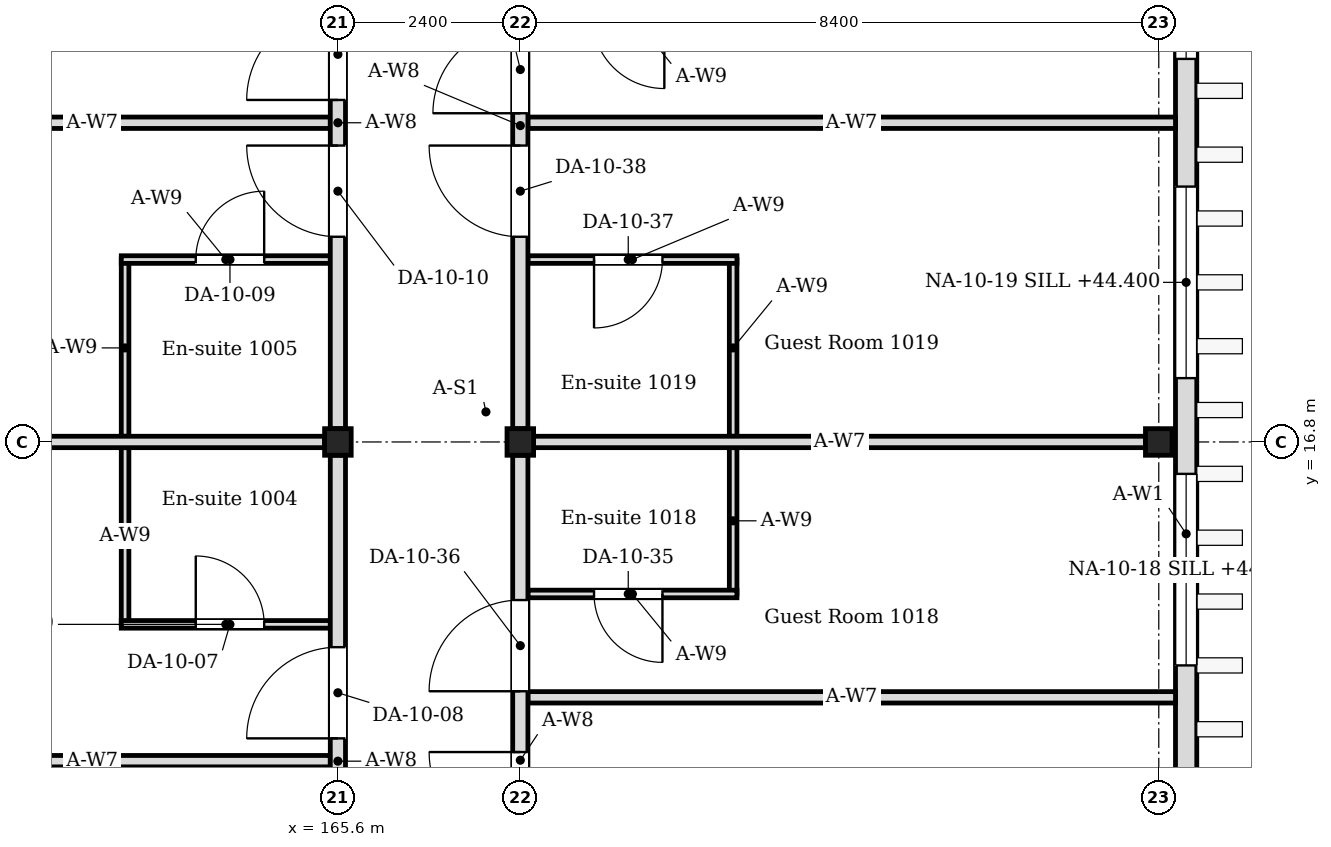
"""IFC4 building model, lengths in metres.
Left out: names, types, materials, properties, quantities, classifications, styles, units other than length and angle.
Written with IfcOpenShell. Run it as: python <this file> out.ifc"""

import sys

from ifc_helpers import new_model, si_unit, direction, frame, frame_2d, origin, origin_2d, place, context, subcontext, project, spatial, rectangle, i_section, extrude, element, fill, save


model = new_model("IFC4")
c1 = context("Model", 3, precision=1e-05, world=origin(), true_north=direction((0.0, 1.0)))
c2 = subcontext(c1, "Body", "Model", "MODEL_VIEW")
j1 = project(units=[si_unit("LENGTHUNIT", "METRE"), si_unit("PLANEANGLEUNIT", "RADIAN")], contexts=[c1])
p1 = place(None, origin())
s1 = spatial("IfcSite", under=j1, at=p1, CompositionType="ELEMENT")
p2 = place(p1, origin())
s2 = spatial("IfcBuilding", under=s1, at=p2, CompositionType="ELEMENT")
p3 = place(p2, frame((0.0, 0.0, 43.8)))
s3 = spatial("IfcBuildingStorey", under=s2, at=p3, CompositionType="ELEMENT", Elevation=43.8)
for number, where, z_axis, x_axis in (
    (1, (165.6, 16.8, 0.0), (0.0, 0.0, 1.0), (1.0, 0.0, 0.0)),
    (2, (168.0, 16.8, 0.0), (0.0, 0.0, 1.0), (1.0, 0.0, 0.0)),
    (3, (176.4, 16.8, 0.0), (0.0, 0.0, 1.0), (1.0, 0.0, 0.0)),
):
    element("IfcColumn", number, at=place(p3, frame(where, z_axis=z_axis, x_axis=x_axis)), inside=s3, PredefinedType="COLUMN", context=c2, shape_type="SweptSolid", body=[
        extrude(i_section(OverallWidth=0.35, OverallDepth=0.35, WebThickness=0.012, FlangeThickness=0.019, FilletRadius=0.013, at=origin_2d()), origin(), (0.0, 0.0, 1.0), 4.2),
    ])
p4 = place(p3, frame((176.76, -0.22, 0.0), z_axis=(0.0, 0.0, 1.0), x_axis=(0.0, 1.0, 0.0)))
e4 = element("IfcWall", 4, at=p4, inside=s3, PredefinedType="SOLIDWALL", context=c2, shape_type="SweptSolid", body=[
    extrude(rectangle(XDim=42.57, YDim=0.28, at=frame_2d((21.285, 0.0))), origin(), (0.0, 0.0, 1.0), 4.05),
])
p5 = place(p4, frame((9.88, 0.0, 0.6)))
e5 = element("IfcOpeningElement", 5, at=p5, cuts=e4, PredefinedType="OPENING", context=c2, shape_type="SweptSolid", body=[
    extrude(rectangle(XDim=2.52, YDim=2.4, at=frame_2d((1.26, 1.2))), frame((0.0, 0.15, 0.0), z_axis=(0.0, -1.0, 0.0), x_axis=(1.0, 0.0, 0.0)), (0.0, 0.0, 1.0), 0.3),
])
p6 = place(p4, frame((14.08, 0.0, 0.6)))
e6 = element("IfcOpeningElement", 6, at=p6, cuts=e4, PredefinedType="OPENING", context=c2, shape_type="SweptSolid", body=[
    extrude(rectangle(XDim=2.52, YDim=2.4, at=frame_2d((1.26, 1.2))), frame((0.0, 0.15, 0.0), z_axis=(0.0, -1.0, 0.0), x_axis=(1.0, 0.0, 0.0)), (0.0, 0.0, 1.0), 0.3),
])
p7 = place(p4, frame((17.86, 0.0, 0.6)))
e7 = element("IfcOpeningElement", 7, at=p7, cuts=e4, PredefinedType="OPENING", context=c2, shape_type="SweptSolid", body=[
    extrude(rectangle(XDim=2.52, YDim=2.4, at=frame_2d((1.26, 1.2))), frame((0.0, 0.15, 0.0), z_axis=(0.0, -1.0, 0.0), x_axis=(1.0, 0.0, 0.0)), (0.0, 0.0, 1.0), 0.3),
])
p8 = place(p4, frame((22.06, 0.0, 0.45)))
e8 = element("IfcOpeningElement", 8, at=p8, cuts=e4, PredefinedType="OPENING", context=c2, shape_type="SweptSolid", body=[
    extrude(rectangle(XDim=2.52, YDim=2.1, at=frame_2d((1.26, 1.05))), frame((0.0, 0.15, 0.0), z_axis=(0.0, -1.0, 0.0), x_axis=(1.0, 0.0, 0.0)), (0.0, 0.0, 1.0), 0.3),
])
p9 = place(p3, frame((162.8, 14.4, 0.0), z_axis=(0.0, 0.0, 1.0), x_axis=(0.0, 1.0, 0.0)))
e9 = element("IfcWall", 9, at=p9, inside=s3, PredefinedType="PARTITIONING", context=c2, shape_type="SweptSolid", body=[
    extrude(rectangle(XDim=2.325, YDim=0.1, at=frame_2d((1.163, 0.0))), origin(), (0.0, 0.0, 1.0), 4.05),
])
p10 = place(p3, frame((162.75, 14.4, 0.0), z_axis=(0.0, 0.0, 1.0), x_axis=(1.0, 0.0, 0.0)))
e10 = element("IfcWall", 10, at=p10, inside=s3, PredefinedType="PARTITIONING", context=c2, shape_type="SweptSolid", body=[
    extrude(rectangle(XDim=2.75, YDim=0.1, at=frame_2d((1.375, 0.0))), origin(), (0.0, 0.0, 1.0), 4.05),
])
p11 = place(p10, frame((0.98, 0.0, 0.0)))
e11 = element("IfcOpeningElement", 11, at=p11, cuts=e10, PredefinedType="OPENING", context=c2, shape_type="SweptSolid", body=[
    extrude(rectangle(XDim=0.9, YDim=2.1, at=frame_2d((0.45, 1.05))), frame((0.0, 0.06, 0.0), z_axis=(0.0, -1.0, 0.0), x_axis=(1.0, 0.0, 0.0)), (0.0, 0.0, 1.0), 0.12),
])
p12 = place(p3, frame((162.8, 16.875, 0.0), z_axis=(0.0, 0.0, 1.0), x_axis=(0.0, 1.0, 0.0)))
e12 = element("IfcWall", 12, at=p12, inside=s3, PredefinedType="PARTITIONING", context=c2, shape_type="SweptSolid", body=[
    extrude(rectangle(XDim=2.325, YDim=0.1, at=frame_2d((1.163, 0.0))), origin(), (0.0, 0.0, 1.0), 4.05),
])
p13 = place(p3, frame((162.75, 19.2, 0.0), z_axis=(0.0, 0.0, 1.0), x_axis=(1.0, 0.0, 0.0)))
e13 = element("IfcWall", 13, at=p13, inside=s3, PredefinedType="PARTITIONING", context=c2, shape_type="SweptSolid", body=[
    extrude(rectangle(XDim=2.75, YDim=0.1, at=frame_2d((1.375, 0.0))), origin(), (0.0, 0.0, 1.0), 4.05),
])
p14 = place(p13, frame((0.98, 0.0, 0.0)))
e14 = element("IfcOpeningElement", 14, at=p14, cuts=e13, PredefinedType="OPENING", context=c2, shape_type="SweptSolid", body=[
    extrude(rectangle(XDim=0.9, YDim=2.1, at=frame_2d((0.45, 1.05))), frame((0.0, 0.06, 0.0), z_axis=(0.0, -1.0, 0.0), x_axis=(1.0, 0.0, 0.0)), (0.0, 0.0, 1.0), 0.12),
])
p15 = place(p3, frame((170.8, 14.8, 0.0), z_axis=(0.0, 0.0, 1.0), x_axis=(0.0, 1.0, 0.0)))
e15 = element("IfcWall", 15, at=p15, inside=s3, PredefinedType="PARTITIONING", context=c2, shape_type="SweptSolid", body=[
    extrude(rectangle(XDim=1.925, YDim=0.1, at=frame_2d((0.962, 0.0))), origin(), (0.0, 0.0, 1.0), 4.05),
])
p16 = place(p3, frame((170.85, 14.8, 0.0), z_axis=(0.0, 0.0, 1.0), x_axis=(-1.0, 0.0, 0.0)))
e16 = element("IfcWall", 16, at=p16, inside=s3, PredefinedType="PARTITIONING", context=c2, shape_type="SweptSolid", body=[
    extrude(rectangle(XDim=2.75, YDim=0.1, at=frame_2d((1.375, 0.0))), origin(), (0.0, 0.0, 1.0), 4.05),
])
p17 = place(p16, frame((0.98, 0.0, 0.0)))
e17 = element("IfcOpeningElement", 17, at=p17, cuts=e16, PredefinedType="OPENING", context=c2, shape_type="SweptSolid", body=[
    extrude(rectangle(XDim=0.9, YDim=2.1, at=frame_2d((0.45, 1.05))), frame((0.0, 0.06, 0.0), z_axis=(0.0, -1.0, 0.0), x_axis=(1.0, 0.0, 0.0)), (0.0, 0.0, 1.0), 0.12),
])
p18 = place(p3, frame((170.8, 16.875, 0.0), z_axis=(0.0, 0.0, 1.0), x_axis=(0.0, 1.0, 0.0)))
e18 = element("IfcWall", 18, at=p18, inside=s3, PredefinedType="PARTITIONING", context=c2, shape_type="SweptSolid", body=[
    extrude(rectangle(XDim=2.325, YDim=0.1, at=frame_2d((1.163, 0.0))), origin(), (0.0, 0.0, 1.0), 4.05),
])
p19 = place(p3, frame((170.85, 19.2, 0.0), z_axis=(0.0, 0.0, 1.0), x_axis=(-1.0, 0.0, 0.0)))
e19 = element("IfcWall", 19, at=p19, inside=s3, PredefinedType="PARTITIONING", context=c2, shape_type="SweptSolid", body=[
    extrude(rectangle(XDim=2.75, YDim=0.1, at=frame_2d((1.375, 0.0))), origin(), (0.0, 0.0, 1.0), 4.05),
])
p20 = place(p19, frame((0.98, 0.0, 0.0)))
e20 = element("IfcOpeningElement", 20, at=p20, cuts=e19, PredefinedType="OPENING", context=c2, shape_type="SweptSolid", body=[
    extrude(rectangle(XDim=0.9, YDim=2.1, at=frame_2d((0.45, 1.05))), frame((0.0, 0.06, 0.0), z_axis=(0.0, -1.0, 0.0), x_axis=(1.0, 0.0, 0.0)), (0.0, 0.0, 1.0), 0.12),
])
for number, where, z_axis, x_axis in (
    (21, (157.375, 16.8, 0.0), (0.0, 0.0, 1.0), (1.0, 0.0, 0.0)),
    (22, (168.175, 16.8, 0.0), (0.0, 0.0, 1.0), (1.0, 0.0, 0.0)),
):
    element("IfcWall", number, at=place(p3, frame(where, z_axis=z_axis, x_axis=x_axis)), inside=s3, PredefinedType="PARTITIONING", context=c2, shape_type="SweptSolid", body=[
        extrude(rectangle(XDim=8.05, YDim=0.15, at=frame_2d((4.025, 0.0))), origin(), (0.0, 0.0, 1.0), 3.604),
    ])
for number, where, z_axis, x_axis in (
    (23, (159.24, 12.6, 0.0), (0.0, 0.0, 1.0), (1.0, 0.0, 0.0)),
    (24, (159.24, 21.0, 0.0), (0.0, 0.0, 1.0), (1.0, 0.0, 0.0)),
):
    element("IfcWall", number, at=place(p3, frame(where, z_axis=z_axis, x_axis=x_axis)), inside=s3, PredefinedType="PARTITIONING", context=c2, shape_type="SweptSolid", body=[
        extrude(rectangle(XDim=6.26, YDim=0.15, at=frame_2d((3.13, 0.0))), origin(), (0.0, 0.0, 1.0), 3.604),
    ])
for number, where, z_axis, x_axis in (
    (25, (168.1, 13.44, 0.0), (0.0, 0.0, 1.0), (1.0, 0.0, 0.0)),
    (26, (168.1, 21.0, 0.0), (0.0, 0.0, 1.0), (1.0, 0.0, 0.0)),
):
    element("IfcWall", number, at=place(p3, frame(where, z_axis=z_axis, x_axis=x_axis)), inside=s3, PredefinedType="PARTITIONING", context=c2, shape_type="SweptSolid", body=[
        extrude(rectangle(XDim=8.52, YDim=0.15, at=frame_2d((4.26, 0.0))), origin(), (0.0, 0.0, 1.0), 3.604),
    ])
p21 = place(p3, frame((165.6, 8.575, 0.0), z_axis=(0.0, 0.0, 1.0), x_axis=(0.0, 1.0, 0.0)))
e27 = element("IfcWall", 27, at=p21, inside=s3, PredefinedType="PARTITIONING", context=c2, shape_type="SweptSolid", body=[
    extrude(rectangle(XDim=8.05, YDim=0.2, at=frame_2d((4.025, 0.0))), origin(), (0.0, 0.0, 1.0), 3.45),
])
p22 = place(p21, frame((2.525, 0.0, 0.0)))
e28 = element("IfcOpeningElement", 28, at=p22, cuts=e27, PredefinedType="OPENING", context=c2, shape_type="SweptSolid", body=[
    extrude(rectangle(XDim=1.2, YDim=2.1, at=frame_2d((0.6, 1.05))), frame((0.0, 0.11, 0.0), z_axis=(0.0, -1.0, 0.0), x_axis=(1.0, 0.0, 0.0)), (0.0, 0.0, 1.0), 0.22),
])
p23 = place(p21, frame((4.325, 0.0, 0.0)))
e29 = element("IfcOpeningElement", 29, at=p23, cuts=e27, PredefinedType="OPENING", context=c2, shape_type="SweptSolid", body=[
    extrude(rectangle(XDim=1.2, YDim=2.1, at=frame_2d((0.6, 1.05))), frame((0.0, 0.11, 0.0), z_axis=(0.0, -1.0, 0.0), x_axis=(1.0, 0.0, 0.0)), (0.0, 0.0, 1.0), 0.22),
])
p24 = place(p3, frame((165.6, 16.975, 0.0), z_axis=(0.0, 0.0, 1.0), x_axis=(0.0, 1.0, 0.0)))
e30 = element("IfcWall", 30, at=p24, inside=s3, PredefinedType="PARTITIONING", context=c2, shape_type="SweptSolid", body=[
    extrude(rectangle(XDim=8.05, YDim=0.2, at=frame_2d((4.025, 0.0))), origin(), (0.0, 0.0, 1.0), 3.45),
])
p25 = place(p24, frame((2.525, 0.0, 0.0)))
e31 = element("IfcOpeningElement", 31, at=p25, cuts=e30, PredefinedType="OPENING", context=c2, shape_type="SweptSolid", body=[
    extrude(rectangle(XDim=1.2, YDim=2.1, at=frame_2d((0.6, 1.05))), frame((0.0, 0.11, 0.0), z_axis=(0.0, -1.0, 0.0), x_axis=(1.0, 0.0, 0.0)), (0.0, 0.0, 1.0), 0.22),
])
p26 = place(p24, frame((4.325, 0.0, 0.0)))
e32 = element("IfcOpeningElement", 32, at=p26, cuts=e30, PredefinedType="OPENING", context=c2, shape_type="SweptSolid", body=[
    extrude(rectangle(XDim=1.2, YDim=2.1, at=frame_2d((0.6, 1.05))), frame((0.0, 0.11, 0.0), z_axis=(0.0, -1.0, 0.0), x_axis=(1.0, 0.0, 0.0)), (0.0, 0.0, 1.0), 0.22),
])
p27 = place(p3, frame((168.0, 8.6, 0.0), z_axis=(0.0, 0.0, 1.0), x_axis=(0.0, 1.0, 0.0)))
e33 = element("IfcWall", 33, at=p27, inside=s3, PredefinedType="PARTITIONING", context=c2, shape_type="SweptSolid", body=[
    extrude(rectangle(XDim=8.025, YDim=0.2, at=frame_2d((4.012, 0.0))), origin(), (0.0, 0.0, 1.0), 3.45),
])
p28 = place(p27, frame((2.92, 0.0, 0.0)))
e34 = element("IfcOpeningElement", 34, at=p28, cuts=e33, PredefinedType="OPENING", context=c2, shape_type="SweptSolid", body=[
    extrude(rectangle(XDim=1.2, YDim=2.1, at=frame_2d((0.6, 1.05))), frame((0.0, 0.11, 0.0), z_axis=(0.0, -1.0, 0.0), x_axis=(1.0, 0.0, 0.0)), (0.0, 0.0, 1.0), 0.22),
])
p29 = place(p27, frame((4.92, 0.0, 0.0)))
e35 = element("IfcOpeningElement", 35, at=p29, cuts=e33, PredefinedType="OPENING", context=c2, shape_type="SweptSolid", body=[
    extrude(rectangle(XDim=1.2, YDim=2.1, at=frame_2d((0.6, 1.05))), frame((0.0, 0.11, 0.0), z_axis=(0.0, -1.0, 0.0), x_axis=(1.0, 0.0, 0.0)), (0.0, 0.0, 1.0), 0.22),
])
p30 = place(p3, frame((168.0, 16.975, 0.0), z_axis=(0.0, 0.0, 1.0), x_axis=(0.0, 1.0, 0.0)))
e36 = element("IfcWall", 36, at=p30, inside=s3, PredefinedType="PARTITIONING", context=c2, shape_type="SweptSolid", body=[
    extrude(rectangle(XDim=7.975, YDim=0.2, at=frame_2d((3.987, 0.0))), origin(), (0.0, 0.0, 1.0), 3.45),
])
p31 = place(p30, frame((2.525, 0.0, 0.0)))
e37 = element("IfcOpeningElement", 37, at=p31, cuts=e36, PredefinedType="OPENING", context=c2, shape_type="SweptSolid", body=[
    extrude(rectangle(XDim=1.2, YDim=2.1, at=frame_2d((0.6, 1.05))), frame((0.0, 0.11, 0.0), z_axis=(0.0, -1.0, 0.0), x_axis=(1.0, 0.0, 0.0)), (0.0, 0.0, 1.0), 0.22),
])
p32 = place(p30, frame((4.15, 0.0, 0.0)))
e38 = element("IfcOpeningElement", 38, at=p32, cuts=e36, PredefinedType="OPENING", context=c2, shape_type="SweptSolid", body=[
    extrude(rectangle(XDim=1.15, YDim=2.1, at=frame_2d((0.575, 1.05))), frame((0.0, 0.11, 0.0), z_axis=(0.0, -1.0, 0.0), x_axis=(1.0, 0.0, 0.0)), (0.0, 0.0, 1.0), 0.22),
])
p33 = place(p6, origin())
e39 = element("IfcWindow", 39, at=p33, inside=s3, PartitioningType="SINGLE_PANEL", PredefinedType="WINDOW", context=c2, shape_type="SweptSolid", body=[
    extrude(rectangle(XDim=2.52, YDim=2.4, at=frame_2d((1.26, 1.2))), frame((0.0, 0.03, 0.0), z_axis=(0.0, -1.0, 0.0), x_axis=(1.0, 0.0, 0.0)), (0.0, 0.0, 1.0), 0.06),
])
fill(e6, e39)
p34 = place(p7, origin())
e40 = element("IfcWindow", 40, at=p34, inside=s3, PartitioningType="SINGLE_PANEL", PredefinedType="WINDOW", context=c2, shape_type="SweptSolid", body=[
    extrude(rectangle(XDim=2.52, YDim=2.4, at=frame_2d((1.26, 1.2))), frame((0.0, 0.03, 0.0), z_axis=(0.0, -1.0, 0.0), x_axis=(1.0, 0.0, 0.0)), (0.0, 0.0, 1.0), 0.06),
])
fill(e7, e40)
p35 = place(p8, origin())
e41 = element("IfcWindow", 41, at=p35, inside=s3, PartitioningType="SINGLE_PANEL", PredefinedType="WINDOW", context=c2, shape_type="SweptSolid", body=[
    extrude(rectangle(XDim=2.52, YDim=2.1, at=frame_2d((1.26, 1.05))), frame((0.0, 0.03, 0.0), z_axis=(0.0, -1.0, 0.0), x_axis=(1.0, 0.0, 0.0)), (0.0, 0.0, 1.0), 0.06),
])
fill(e8, e41)
p36 = place(p11, origin())
e42 = element("IfcDoor", 42, at=p36, inside=s3, OperationType="SINGLE_SWING_LEFT", PredefinedType="DOOR", context=c2, shape_type="SweptSolid", body=[
    extrude(rectangle(XDim=0.9, YDim=2.1, at=frame_2d((0.45, 1.05))), frame((0.0, 0.025, 0.0), z_axis=(0.0, -1.0, 0.0), x_axis=(1.0, 0.0, 0.0)), (0.0, 0.0, 1.0), 0.05),
])
fill(e11, e42)
p37 = place(p23, origin())
e43 = element("IfcDoor", 43, at=p37, inside=s3, OperationType="SINGLE_SWING_LEFT", PredefinedType="DOOR", context=c2, shape_type="SweptSolid", body=[
    extrude(rectangle(XDim=1.2, YDim=2.1, at=frame_2d((0.6, 1.05))), frame((0.0, 0.025, 0.0), z_axis=(0.0, -1.0, 0.0), x_axis=(1.0, 0.0, 0.0)), (0.0, 0.0, 1.0), 0.05),
])
fill(e29, e43)
p38 = place(p14, origin())
e44 = element("IfcDoor", 44, at=p38, inside=s3, OperationType="SINGLE_SWING_RIGHT", PredefinedType="DOOR", context=c2, shape_type="SweptSolid", body=[
    extrude(rectangle(XDim=0.9, YDim=2.1, at=frame_2d((0.45, 1.05))), frame((0.0, 0.025, 0.0), z_axis=(0.0, -1.0, 0.0), x_axis=(1.0, 0.0, 0.0)), (0.0, 0.0, 1.0), 0.05),
])
fill(e14, e44)
p39 = place(p25, origin())
e45 = element("IfcDoor", 45, at=p39, inside=s3, OperationType="SINGLE_SWING_RIGHT", PredefinedType="DOOR", context=c2, shape_type="SweptSolid", body=[
    extrude(rectangle(XDim=1.2, YDim=2.1, at=frame_2d((0.6, 1.05))), frame((0.0, 0.025, 0.0), z_axis=(0.0, -1.0, 0.0), x_axis=(1.0, 0.0, 0.0)), (0.0, 0.0, 1.0), 0.05),
])
fill(e31, e45)
p40 = place(p26, origin())
e46 = element("IfcDoor", 46, at=p40, inside=s3, OperationType="SINGLE_SWING_LEFT", PredefinedType="DOOR", context=c2, shape_type="SweptSolid", body=[
    extrude(rectangle(XDim=1.2, YDim=2.1, at=frame_2d((0.6, 1.05))), frame((0.0, 0.025, 0.0), z_axis=(0.0, -1.0, 0.0), x_axis=(1.0, 0.0, 0.0)), (0.0, 0.0, 1.0), 0.05),
])
fill(e32, e46)
p41 = place(p28, origin())
e47 = element("IfcDoor", 47, at=p41, inside=s3, OperationType="SINGLE_SWING_RIGHT", PredefinedType="DOOR", context=c2, shape_type="SweptSolid", body=[
    extrude(rectangle(XDim=1.2, YDim=2.1, at=frame_2d((0.6, 1.05))), frame((0.0, 0.025, 0.0), z_axis=(0.0, -1.0, 0.0), x_axis=(1.0, 0.0, 0.0)), (0.0, 0.0, 1.0), 0.05),
])
fill(e34, e47)
p42 = place(p17, origin())
e48 = element("IfcDoor", 48, at=p42, inside=s3, OperationType="SINGLE_SWING_LEFT", PredefinedType="DOOR", context=c2, shape_type="SweptSolid", body=[
    extrude(rectangle(XDim=0.9, YDim=2.1, at=frame_2d((0.45, 1.05))), frame((0.0, 0.025, 0.0), z_axis=(0.0, -1.0, 0.0), x_axis=(1.0, 0.0, 0.0)), (0.0, 0.0, 1.0), 0.05),
])
fill(e17, e48)
p43 = place(p29, origin())
e49 = element("IfcDoor", 49, at=p43, inside=s3, OperationType="SINGLE_SWING_LEFT", PredefinedType="DOOR", context=c2, shape_type="SweptSolid", body=[
    extrude(rectangle(XDim=1.2, YDim=2.1, at=frame_2d((0.6, 1.05))), frame((0.0, 0.025, 0.0), z_axis=(0.0, -1.0, 0.0), x_axis=(1.0, 0.0, 0.0)), (0.0, 0.0, 1.0), 0.05),
])
fill(e35, e49)
p44 = place(p20, origin())
e50 = element("IfcDoor", 50, at=p44, inside=s3, OperationType="SINGLE_SWING_RIGHT", PredefinedType="DOOR", context=c2, shape_type="SweptSolid", body=[
    extrude(rectangle(XDim=0.9, YDim=2.1, at=frame_2d((0.45, 1.05))), frame((0.0, 0.025, 0.0), z_axis=(0.0, -1.0, 0.0), x_axis=(1.0, 0.0, 0.0)), (0.0, 0.0, 1.0), 0.05),
])
fill(e20, e50)
p45 = place(p31, origin())
e51 = element("IfcDoor", 51, at=p45, inside=s3, OperationType="SINGLE_SWING_RIGHT", PredefinedType="DOOR", context=c2, shape_type="SweptSolid", body=[
    extrude(rectangle(XDim=1.2, YDim=2.1, at=frame_2d((0.6, 1.05))), frame((0.0, 0.025, 0.0), z_axis=(0.0, -1.0, 0.0), x_axis=(1.0, 0.0, 0.0)), (0.0, 0.0, 1.0), 0.05),
])
fill(e37, e51)
p46 = place(p32, origin())
e52 = element("IfcDoor", 52, at=p46, inside=s3, OperationType="SINGLE_SWING_LEFT", PredefinedType="DOOR", context=c2, shape_type="SweptSolid", body=[
    extrude(rectangle(XDim=1.15, YDim=2.1, at=frame_2d((0.575, 1.05))), frame((0.0, 0.025, 0.0), z_axis=(0.0, -1.0, 0.0), x_axis=(1.0, 0.0, 0.0)), (0.0, 0.0, 1.0), 0.05),
])
fill(e38, e52)
save(model, sys.argv[1])
